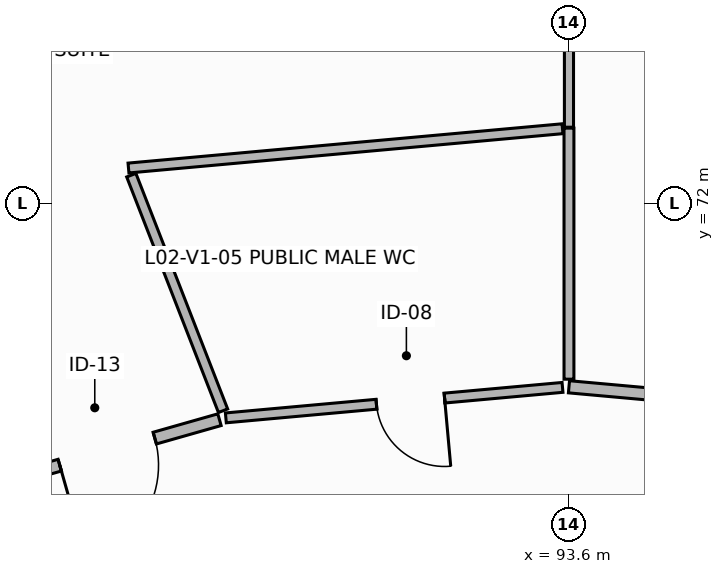
"""IFC4 building model, lengths in metres.
Left out: names, types, materials, properties, quantities, classifications, styles, units other than length and angle.
Written with IfcOpenShell. Run it as: python <this file> out.ifc"""

import sys

from ifc_helpers import new_model, si_unit, direction, frame, frame_2d, origin, place, context, subcontext, project, spatial, rectangle, extrude, element, fill, save


model = new_model("IFC4")
c1 = context("Model", 3, precision=1e-05, world=origin(), true_north=direction((0.0, 1.0)))
c2 = subcontext(c1, "Body", "Model", "MODEL_VIEW")
j1 = project(units=[si_unit("LENGTHUNIT", "METRE"), si_unit("PLANEANGLEUNIT", "RADIAN")], contexts=[c1])
p1 = place(None, origin())
s1 = spatial("IfcSite", under=j1, at=p1, CompositionType="ELEMENT")
p2 = place(p1, origin())
s2 = spatial("IfcBuilding", under=s1, at=p2, CompositionType="ELEMENT")
p3 = place(p2, frame((0.0, 0.0, 8.4)))
s3 = spatial("IfcBuildingStorey", under=s2, at=p3, CompositionType="ELEMENT", Elevation=8.4)
p4 = place(p3, frame((98.009, 69.191, 0.0), z_axis=(0.0, 0.0, 1.0), x_axis=(-0.995926589216, 0.090167781902, 0.0)))
e1 = element("IfcWall", 1, at=p4, inside=s3, PredefinedType="PARTITIONING", context=c2, shape_type="SweptSolid", body=[
    extrude(rectangle(XDim=4.427, YDim=0.16, at=frame_2d((2.213, 0.0))), origin(), (0.0, 0.0, 1.0), 2.99),
])
p5 = place(p4, frame((1.72, 0.0, 0.0)))
e2 = element("IfcOpeningElement", 2, at=p5, cuts=e1, PredefinedType="OPENING", context=c2, shape_type="SweptSolid", body=[
    extrude(rectangle(XDim=1.4, YDim=2.3, at=frame_2d((0.7, 1.15))), frame((0.0, 0.09, 0.0), z_axis=(0.0, -1.0, 0.0), x_axis=(1.0, 0.0, 0.0)), (0.0, 0.0, 1.0), 0.18),
])
p6 = place(p3, frame((93.6, 69.69, 0.0), z_axis=(0.0, 0.0, 1.0), x_axis=(0.0, 1.0, 0.0)))
e3 = element("IfcWall", 3, at=p6, inside=s3, PredefinedType="PARTITIONING", context=c2, shape_type="SweptSolid", body=[
    extrude(rectangle(XDim=3.303, YDim=0.13, at=frame_2d((1.651, 0.0))), origin(), (0.0, 0.0, 1.0), 2.99),
])
p7 = place(p3, frame((93.6, 73.005, 0.0), z_axis=(0.0, 0.0, 1.0), x_axis=(0.0, 1.0, 0.0)))
e4 = element("IfcWall", 4, at=p7, inside=s3, PredefinedType="PARTITIONING", context=c2, shape_type="SweptSolid", body=[
    extrude(rectangle(XDim=6.26, YDim=0.12, at=frame_2d((3.13, 0.0))), origin(), (0.0, 0.0, 1.0), 2.99),
])
p8 = place(p3, frame((87.805, 72.468, 0.0), z_axis=(0.0, 0.0, 1.0), x_axis=(0.995924559999, 0.090190192324, 0.0)))
e5 = element("IfcWall", 5, at=p8, inside=s3, PredefinedType="PARTITIONING", context=c2, shape_type="SweptSolid", body=[
    extrude(rectangle(XDim=5.733, YDim=0.13, at=frame_2d((2.867, 0.0))), origin(), (0.0, 0.0, 1.0), 2.99),
])
p9 = place(p3, frame((93.515, 69.582, 0.0), z_axis=(0.0, 0.0, 1.0), x_axis=(-0.995923749059, -0.090199146668, 0.0)))
e6 = element("IfcWall", 6, at=p9, inside=s3, PredefinedType="PARTITIONING", context=c2, shape_type="SweptSolid", body=[
    extrude(rectangle(XDim=4.447, YDim=0.13, at=frame_2d((2.224, 0.0))), origin(), (0.0, 0.0, 1.0), 2.99),
])
p10 = place(p9, frame((1.558, 0.0, 0.0)))
e7 = element("IfcOpeningElement", 7, at=p10, cuts=e6, PredefinedType="OPENING", context=c2, shape_type="SweptSolid", body=[
    extrude(rectangle(XDim=0.9, YDim=2.1, at=frame_2d((0.45, 1.05))), frame((0.0, 0.075, 0.0), z_axis=(0.0, -1.0, 0.0), x_axis=(1.0, 0.0, 0.0)), (0.0, 0.0, 1.0), 0.15),
])
p11 = place(p3, frame((89.049, 69.275, 0.0), z_axis=(0.0, 0.0, 1.0), x_axis=(-0.362920895293, 0.931819952437, 0.0)))
e8 = element("IfcWall", 8, at=p11, inside=s3, PredefinedType="PARTITIONING", context=c2, shape_type="SweptSolid", body=[
    extrude(rectangle(XDim=3.326, YDim=0.13, at=frame_2d((1.663, 0.0))), origin(), (0.0, 0.0, 1.0), 2.99),
])
p12 = place(p3, frame((89.002, 69.157, 0.0), z_axis=(0.0, 0.0, 1.0), x_axis=(-0.961809330403, -0.273720317021, 0.0)))
e9 = element("IfcWall", 9, at=p12, inside=s3, PredefinedType="PARTITIONING", context=c2, shape_type="SweptSolid", body=[
    extrude(rectangle(XDim=4.286, YDim=0.16, at=frame_2d((2.143, 0.0))), origin(), (0.0, 0.0, 1.0), 2.99),
])
p13 = place(p12, frame((0.885, 0.0, 0.0)))
e10 = element("IfcOpeningElement", 10, at=p13, cuts=e9, PredefinedType="OPENING", context=c2, shape_type="SweptSolid", body=[
    extrude(rectangle(XDim=1.3, YDim=2.25, at=frame_2d((0.65, 1.125))), frame((0.0, 0.09, 0.0), z_axis=(0.0, -1.0, 0.0), x_axis=(1.0, 0.0, 0.0)), (0.0, 0.0, 1.0), 0.18),
])
p14 = place(p10, origin())
e11 = element("IfcDoor", 11, at=p14, inside=s3, OperationType="SINGLE_SWING_LEFT", PredefinedType="DOOR", context=c2, shape_type="SweptSolid", body=[
    extrude(rectangle(XDim=0.9, YDim=2.1, at=frame_2d((0.45, 1.05))), frame((0.0, 0.025, 0.0), z_axis=(0.0, -1.0, 0.0), x_axis=(1.0, 0.0, 0.0)), (0.0, 0.0, 1.0), 0.05),
])
fill(e7, e11)
p15 = place(p13, origin())
e12 = element("IfcDoor", 12, at=p15, inside=s3, OperationType="SINGLE_SWING_RIGHT", PredefinedType="DOOR", context=c2, shape_type="SweptSolid", body=[
    extrude(rectangle(XDim=1.3, YDim=2.25, at=frame_2d((0.65, 1.125))), frame((0.0, 0.025, 0.0), z_axis=(0.0, -1.0, 0.0), x_axis=(1.0, 0.0, 0.0)), (0.0, 0.0, 1.0), 0.05),
])
fill(e10, e12)
save(model, sys.argv[1])
